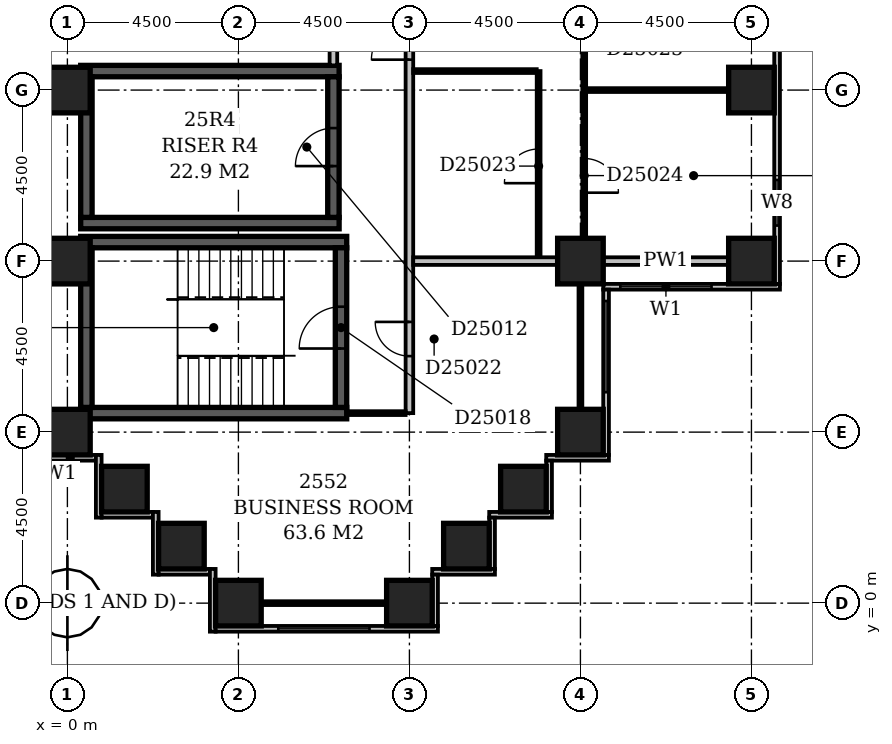
"""IFC4 building model, lengths in metres.
Left out: names, types, materials, properties, quantities, classifications, styles, units other than length and angle.
Written with IfcOpenShell. Run it as: python <this file> out.ifc"""

import sys

from ifc_helpers import new_model, si_unit, direction, frame, frame_2d, origin, origin_2d, place, context, subcontext, project, spatial, rectangle, extrude, element, fill, save


model = new_model("IFC4")
c1 = context("Model", 3, precision=1e-05, world=origin(), true_north=direction((0.0, 1.0)))
c2 = subcontext(c1, "Body", "Model", "MODEL_VIEW")
j1 = project(units=[si_unit("LENGTHUNIT", "METRE"), si_unit("PLANEANGLEUNIT", "RADIAN")], contexts=[c1])
p1 = place(None, origin())
s1 = spatial("IfcSite", under=j1, at=p1, CompositionType="ELEMENT")
p2 = place(p1, origin())
s2 = spatial("IfcBuilding", under=s1, at=p2, CompositionType="ELEMENT")
p3 = place(p2, frame((0.0, 0.0, 101.0)))
s3 = spatial("IfcBuildingStorey", under=s2, at=p3, CompositionType="ELEMENT", Elevation=101.0)
for number, where, z_axis, x_axis in (
    (1, (0.35, 5.0, -0.3), (0.0, 0.0, 1.0), (1.0, 0.0, 0.0)),
    (2, (0.35, 9.5, -0.3), (0.0, 0.0, 1.0), (1.0, 0.0, 0.0)),
):
    element("IfcWall", number, at=place(p3, frame(where, z_axis=z_axis, x_axis=x_axis)), inside=s3, PredefinedType="SHEAR", context=c2, shape_type="SweptSolid", body=[
        extrude(rectangle(XDim=7.0, YDim=0.3, at=frame_2d((3.5, 0.0))), origin(), (0.0, 0.0, 1.0), 3.6),
    ])
for number, where, z_axis, x_axis in (
    (3, (0.35, 10.0, -0.3), (0.0, 0.0, 1.0), (1.0, 0.0, 0.0)),
    (4, (0.35, 14.0, -0.3), (0.0, 0.0, 1.0), (1.0, 0.0, 0.0)),
):
    element("IfcWall", number, at=place(p3, frame(where, z_axis=z_axis, x_axis=x_axis)), inside=s3, PredefinedType="SHEAR", context=c2, shape_type="SweptSolid", body=[
        extrude(rectangle(XDim=6.8, YDim=0.3, at=frame_2d((3.4, 0.0))), origin(), (0.0, 0.0, 1.0), 3.6),
    ])
p4 = place(p3, frame((0.5, 5.15, -0.3), z_axis=(0.0, 0.0, 1.0), x_axis=(0.0, 1.0, 0.0)))
e5 = element("IfcWall", 5, at=p4, inside=s3, PredefinedType="SHEAR", context=c2, shape_type="SweptSolid", body=[
    extrude(rectangle(XDim=4.2, YDim=0.3, at=frame_2d((2.1, 0.0))), origin(), (0.0, 0.0, 1.0), 3.6),
])
p5 = place(p3, frame((0.5, 10.15, -0.3), z_axis=(0.0, 0.0, 1.0), x_axis=(0.0, 1.0, 0.0)))
e6 = element("IfcWall", 6, at=p5, inside=s3, PredefinedType="SHEAR", context=c2, shape_type="SweptSolid", body=[
    extrude(rectangle(XDim=3.7, YDim=0.3, at=frame_2d((1.85, 0.0))), origin(), (0.0, 0.0, 1.0), 3.6),
])
p6 = place(p3, frame((7.0, 10.15, -0.3), z_axis=(0.0, 0.0, 1.0), x_axis=(0.0, 1.0, 0.0)))
e7 = element("IfcWall", 7, at=p6, inside=s3, PredefinedType="SHEAR", context=c2, shape_type="SweptSolid", body=[
    extrude(rectangle(XDim=3.7, YDim=0.3, at=frame_2d((1.85, 0.0))), origin(), (0.0, 0.0, 1.0), 3.6),
])
p7 = place(p6, frame((1.35, 0.0, 0.3)))
e8 = element("IfcOpeningElement", 8, at=p7, cuts=e7, PredefinedType="OPENING", context=c2, shape_type="SweptSolid", body=[
    extrude(rectangle(XDim=1.0, YDim=2.1, at=frame_2d((0.5, 1.05))), frame((0.0, 0.162, 0.0), z_axis=(0.0, -1.0, 0.0), x_axis=(1.0, 0.0, 0.0)), (0.0, 0.0, 1.0), 0.324),
])
p8 = place(p3, frame((7.2, 5.15, -0.3), z_axis=(0.0, 0.0, 1.0), x_axis=(0.0, 1.0, 0.0)))
e9 = element("IfcWall", 9, at=p8, inside=s3, PredefinedType="SHEAR", context=c2, shape_type="SweptSolid", body=[
    extrude(rectangle(XDim=4.2, YDim=0.3, at=frame_2d((2.1, 0.0))), origin(), (0.0, 0.0, 1.0), 3.6),
])
p9 = place(p8, frame((1.55, 0.0, 0.3)))
e10 = element("IfcOpeningElement", 10, at=p9, cuts=e9, PredefinedType="OPENING", context=c2, shape_type="SweptSolid", body=[
    extrude(rectangle(XDim=1.1, YDim=2.1, at=frame_2d((0.55, 1.05))), frame((0.0, 0.162, 0.0), z_axis=(0.0, -1.0, 0.0), x_axis=(1.0, 0.0, 0.0)), (0.0, 0.0, 1.0), 0.324),
])
for number, where, z_axis, x_axis in (
    (11, (4.5, 0.0, -0.3), (0.0, 0.0, 1.0), (1.0, 0.0, 0.0)),
    (12, (9.0, 0.0, -0.3), (0.0, 0.0, 1.0), (1.0, 0.0, 0.0)),
    (13, (3.0, 1.5, -0.3), (0.0, 0.0, 1.0), (1.0, 0.0, 0.0)),
    (14, (10.5, 1.5, -0.3), (0.0, 0.0, 1.0), (1.0, 0.0, 0.0)),
    (15, (1.5, 3.0, -0.3), (0.0, 0.0, 1.0), (1.0, 0.0, 0.0)),
    (16, (12.0, 3.0, -0.3), (0.0, 0.0, 1.0), (1.0, 0.0, 0.0)),
    (17, (0.0, 4.5, -0.3), (0.0, 0.0, 1.0), (1.0, 0.0, 0.0)),
    (18, (13.5, 4.5, -0.3), (0.0, 0.0, 1.0), (1.0, 0.0, 0.0)),
    (19, (0.0, 9.0, -0.3), (0.0, 0.0, 1.0), (1.0, 0.0, 0.0)),
    (20, (13.5, 9.0, -0.3), (0.0, 0.0, 1.0), (1.0, 0.0, 0.0)),
    (21, (18.0, 9.0, -0.3), (0.0, 0.0, 1.0), (1.0, 0.0, 0.0)),
    (22, (0.0, 13.5, -0.3), (0.0, 0.0, 1.0), (1.0, 0.0, 0.0)),
    (23, (18.0, 13.5, -0.3), (0.0, 0.0, 1.0), (1.0, 0.0, 0.0)),
):
    element("IfcColumn", number, at=place(p3, frame(where, z_axis=z_axis, x_axis=x_axis)), inside=s3, PredefinedType="COLUMN", context=c2, shape_type="SweptSolid", body=[
        extrude(rectangle(XDim=1.2, YDim=1.2, at=origin_2d()), origin(), (0.0, 0.0, 1.0), 3.6),
    ])
p10 = place(p3, frame((9.675, -0.6, 0.0), z_axis=(0.0, 0.0, 1.0), x_axis=(0.0, 1.0, 0.0)))
e24 = element("IfcWall", 24, at=p10, inside=s3, PredefinedType="STANDARD", context=c2, shape_type="SweptSolid", body=[
    extrude(rectangle(XDim=1.35, YDim=0.15, at=frame_2d((0.675, 0.0))), origin(), (0.0, 0.0, 1.0), 2.7),
])
p11 = place(p3, frame((9.6, 0.825, 0.0), z_axis=(0.0, 0.0, 1.0), x_axis=(1.0, 0.0, 0.0)))
e25 = element("IfcWall", 25, at=p11, inside=s3, PredefinedType="STANDARD", context=c2, shape_type="SweptSolid", body=[
    extrude(rectangle(XDim=1.65, YDim=0.15, at=frame_2d((0.825, 0.0))), origin(), (0.0, 0.0, 1.0), 2.7),
])
p12 = place(p3, frame((11.175, 0.9, 0.0), z_axis=(0.0, 0.0, 1.0), x_axis=(0.0, 1.0, 0.0)))
e26 = element("IfcWall", 26, at=p12, inside=s3, PredefinedType="STANDARD", context=c2, shape_type="SweptSolid", body=[
    extrude(rectangle(XDim=1.35, YDim=0.15, at=frame_2d((0.675, 0.0))), origin(), (0.0, 0.0, 1.0), 2.7),
])
p13 = place(p3, frame((11.1, 2.325, 0.0), z_axis=(0.0, 0.0, 1.0), x_axis=(1.0, 0.0, 0.0)))
e27 = element("IfcWall", 27, at=p13, inside=s3, PredefinedType="STANDARD", context=c2, shape_type="SweptSolid", body=[
    extrude(rectangle(XDim=1.65, YDim=0.15, at=frame_2d((0.825, 0.0))), origin(), (0.0, 0.0, 1.0), 2.7),
])
p14 = place(p3, frame((12.675, 2.4, 0.0), z_axis=(0.0, 0.0, 1.0), x_axis=(0.0, 1.0, 0.0)))
e28 = element("IfcWall", 28, at=p14, inside=s3, PredefinedType="STANDARD", context=c2, shape_type="SweptSolid", body=[
    extrude(rectangle(XDim=1.35, YDim=0.15, at=frame_2d((0.675, 0.0))), origin(), (0.0, 0.0, 1.0), 2.7),
])
p15 = place(p3, frame((12.6, 3.825, 0.0), z_axis=(0.0, 0.0, 1.0), x_axis=(1.0, 0.0, 0.0)))
e29 = element("IfcWall", 29, at=p15, inside=s3, PredefinedType="STANDARD", context=c2, shape_type="SweptSolid", body=[
    extrude(rectangle(XDim=1.65, YDim=0.15, at=frame_2d((0.825, 0.0))), origin(), (0.0, 0.0, 1.0), 2.7),
])
p16 = place(p3, frame((14.175, 3.9, 0.0), z_axis=(0.0, 0.0, 1.0), x_axis=(0.0, 1.0, 0.0)))
e30 = element("IfcWall", 30, at=p16, inside=s3, PredefinedType="STANDARD", context=c2, shape_type="SweptSolid", body=[
    extrude(rectangle(XDim=4.35, YDim=0.15, at=frame_2d((2.175, 0.0))), origin(), (0.0, 0.0, 1.0), 2.7),
])
p17 = place(p16, frame((1.65, 0.0, 0.6)))
e31 = element("IfcOpeningElement", 31, at=p17, cuts=e30, PredefinedType="OPENING", context=c2, shape_type="SweptSolid", body=[
    extrude(rectangle(XDim=2.4, YDim=1.8, at=frame_2d((1.2, 0.9))), frame((0.0, 0.087, 0.0), z_axis=(0.0, -1.0, 0.0), x_axis=(1.0, 0.0, 0.0)), (0.0, 0.0, 1.0), 0.174),
])
p18 = place(p3, frame((14.1, 8.325, 0.0), z_axis=(0.0, 0.0, 1.0), x_axis=(1.0, 0.0, 0.0)))
e32 = element("IfcWall", 32, at=p18, inside=s3, PredefinedType="STANDARD", context=c2, shape_type="SweptSolid", body=[
    extrude(rectangle(XDim=4.65, YDim=0.15, at=frame_2d((2.325, 0.0))), origin(), (0.0, 0.0, 1.0), 2.7),
])
p19 = place(p18, frame((0.45, 0.0, 0.6)))
e33 = element("IfcOpeningElement", 33, at=p19, cuts=e32, PredefinedType="OPENING", context=c2, shape_type="SweptSolid", body=[
    extrude(rectangle(XDim=2.4, YDim=1.8, at=frame_2d((1.2, 0.9))), frame((0.0, 0.087, 0.0), z_axis=(0.0, -1.0, 0.0), x_axis=(1.0, 0.0, 0.0)), (0.0, 0.0, 1.0), 0.174),
])
p20 = place(p3, frame((18.675, 8.4, 0.0), z_axis=(0.0, 0.0, 1.0), x_axis=(0.0, 1.0, 0.0)))
e34 = element("IfcWall", 34, at=p20, inside=s3, PredefinedType="STANDARD", context=c2, shape_type="SweptSolid", body=[
    extrude(rectangle(XDim=8.85, YDim=0.15, at=frame_2d((4.425, 0.0))), origin(), (0.0, 0.0, 1.0), 2.7),
])
p21 = place(p20, frame((1.535, 0.0, 0.6)))
e35 = element("IfcOpeningElement", 35, at=p21, cuts=e34, PredefinedType="OPENING", context=c2, shape_type="SweptSolid", body=[
    extrude(rectangle(XDim=1.2, YDim=1.8, at=frame_2d((0.6, 0.9))), frame((0.0, 0.087, 0.0), z_axis=(0.0, -1.0, 0.0), x_axis=(1.0, 0.0, 0.0)), (0.0, 0.0, 1.0), 0.174),
])
p22 = place(p20, frame((6.15, 0.0, 0.6)))
e36 = element("IfcOpeningElement", 36, at=p22, cuts=e34, PredefinedType="OPENING", context=c2, shape_type="SweptSolid", body=[
    extrude(rectangle(XDim=2.4, YDim=1.8, at=frame_2d((1.2, 0.9))), frame((0.0, 0.087, 0.0), z_axis=(0.0, -1.0, 0.0), x_axis=(1.0, 0.0, 0.0)), (0.0, 0.0, 1.0), 0.174),
])
p23 = place(p3, frame((-0.6, 3.825, 0.0), z_axis=(0.0, 0.0, 1.0), x_axis=(1.0, 0.0, 0.0)))
e37 = element("IfcWall", 37, at=p23, inside=s3, PredefinedType="STANDARD", context=c2, shape_type="SweptSolid", body=[
    extrude(rectangle(XDim=1.35, YDim=0.15, at=frame_2d((0.675, 0.0))), origin(), (0.0, 0.0, 1.0), 2.7),
])
p24 = place(p3, frame((0.825, 3.9, 0.0), z_axis=(0.0, 0.0, 1.0), x_axis=(0.0, -1.0, 0.0)))
e38 = element("IfcWall", 38, at=p24, inside=s3, PredefinedType="STANDARD", context=c2, shape_type="SweptSolid", body=[
    extrude(rectangle(XDim=1.65, YDim=0.15, at=frame_2d((0.825, 0.0))), origin(), (0.0, 0.0, 1.0), 2.7),
])
p25 = place(p3, frame((0.9, 2.325, 0.0), z_axis=(0.0, 0.0, 1.0), x_axis=(1.0, 0.0, 0.0)))
e39 = element("IfcWall", 39, at=p25, inside=s3, PredefinedType="STANDARD", context=c2, shape_type="SweptSolid", body=[
    extrude(rectangle(XDim=1.35, YDim=0.15, at=frame_2d((0.675, 0.0))), origin(), (0.0, 0.0, 1.0), 2.7),
])
p26 = place(p3, frame((2.325, 2.4, 0.0), z_axis=(0.0, 0.0, 1.0), x_axis=(0.0, -1.0, 0.0)))
e40 = element("IfcWall", 40, at=p26, inside=s3, PredefinedType="STANDARD", context=c2, shape_type="SweptSolid", body=[
    extrude(rectangle(XDim=1.65, YDim=0.15, at=frame_2d((0.825, 0.0))), origin(), (0.0, 0.0, 1.0), 2.7),
])
p27 = place(p3, frame((2.4, 0.825, 0.0), z_axis=(0.0, 0.0, 1.0), x_axis=(1.0, 0.0, 0.0)))
e41 = element("IfcWall", 41, at=p27, inside=s3, PredefinedType="STANDARD", context=c2, shape_type="SweptSolid", body=[
    extrude(rectangle(XDim=1.35, YDim=0.15, at=frame_2d((0.675, 0.0))), origin(), (0.0, 0.0, 1.0), 2.7),
])
p28 = place(p3, frame((3.825, 0.9, 0.0), z_axis=(0.0, 0.0, 1.0), x_axis=(0.0, -1.0, 0.0)))
e42 = element("IfcWall", 42, at=p28, inside=s3, PredefinedType="STANDARD", context=c2, shape_type="SweptSolid", body=[
    extrude(rectangle(XDim=1.65, YDim=0.15, at=frame_2d((0.825, 0.0))), origin(), (0.0, 0.0, 1.0), 2.7),
])
p29 = place(p3, frame((3.9, -0.675, 0.0), z_axis=(0.0, 0.0, 1.0), x_axis=(1.0, 0.0, 0.0)))
e43 = element("IfcWall", 43, at=p29, inside=s3, PredefinedType="STANDARD", context=c2, shape_type="SweptSolid", body=[
    extrude(rectangle(XDim=5.85, YDim=0.15, at=frame_2d((2.925, 0.0))), origin(), (0.0, 0.0, 1.0), 2.7),
])
p30 = place(p29, frame((1.65, 0.0, 0.6)))
e44 = element("IfcOpeningElement", 44, at=p30, cuts=e43, PredefinedType="OPENING", context=c2, shape_type="SweptSolid", body=[
    extrude(rectangle(XDim=2.4, YDim=1.8, at=frame_2d((1.2, 0.9))), frame((0.0, 0.087, 0.0), z_axis=(0.0, -1.0, 0.0), x_axis=(1.0, 0.0, 0.0)), (0.0, 0.0, 1.0), 0.174),
])
p31 = place(p3, frame((5.1, 0.0, 0.0), z_axis=(0.0, 0.0, 1.0), x_axis=(1.0, 0.0, 0.0)))
e45 = element("IfcWall", 45, at=p31, inside=s3, PredefinedType="PARTITIONING", context=c2, shape_type="SweptSolid", body=[
    extrude(rectangle(XDim=3.3, YDim=0.1, at=frame_2d((1.65, 0.0))), origin(), (0.0, 0.0, 1.0), 2.7),
])
p32 = place(p3, frame((0.0, 4.4, 0.0), z_axis=(0.0, 0.0, 1.0), x_axis=(0.0, 1.0, 0.0)))
e46 = element("IfcWall", 46, at=p32, inside=s3, PredefinedType="PARTITIONING", context=c2, shape_type="SweptSolid", body=[
    extrude(rectangle(XDim=0.7, YDim=0.1, at=frame_2d((0.35, 0.0))), origin(), (0.0, 0.0, 1.0), 2.7),
])
p33 = place(p3, frame((7.349, 5.0, 0.0), z_axis=(0.0, 0.0, 1.0), x_axis=(1.0, 0.0, 0.0)))
e47 = element("IfcWall", 47, at=p33, inside=s3, PredefinedType="PARTITIONING", context=c2, shape_type="SweptSolid", body=[
    extrude(rectangle(XDim=1.551, YDim=0.1, at=frame_2d((0.775, 0.0))), origin(), (0.0, 0.0, 1.0), 3.3),
])
p34 = place(p3, frame((9.0, 5.0, 0.0), z_axis=(0.0, 0.0, 1.0), x_axis=(0.0, 1.0, 0.0)))
e48 = element("IfcWall", 48, at=p34, inside=s3, PredefinedType="PARTITIONING", context=c2, shape_type="SweptSolid", body=[
    extrude(rectangle(XDim=44.5, YDim=0.2, at=frame_2d((22.25, 0.0))), origin(), (0.0, 0.0, 1.0), 3.3),
])
p35 = place(p34, frame((18.4, 0.0, 0.0)))
e49 = element("IfcOpeningElement", 49, at=p35, cuts=e48, PredefinedType="OPENING", context=c2, shape_type="SweptSolid", body=[
    extrude(rectangle(XDim=1.0, YDim=2.1, at=frame_2d((0.5, 1.05))), frame((0.0, 0.112, 0.0), z_axis=(0.0, -1.0, 0.0), x_axis=(1.0, 0.0, 0.0)), (0.0, 0.0, 1.0), 0.224),
])
p36 = place(p34, frame((9.3, 0.0, 0.0)))
e50 = element("IfcOpeningElement", 50, at=p36, cuts=e48, PredefinedType="OPENING", context=c2, shape_type="SweptSolid", body=[
    extrude(rectangle(XDim=1.0, YDim=2.1, at=frame_2d((0.5, 1.05))), frame((0.0, 0.112, 0.0), z_axis=(0.0, -1.0, 0.0), x_axis=(1.0, 0.0, 0.0)), (0.0, 0.0, 1.0), 0.224),
])
p37 = place(p34, frame((37.25, 0.0, 0.0)))
e51 = element("IfcOpeningElement", 51, at=p37, cuts=e48, PredefinedType="OPENING", context=c2, shape_type="SweptSolid", body=[
    extrude(rectangle(XDim=0.9, YDim=2.1, at=frame_2d((0.45, 1.05))), frame((0.0, 0.112, 0.0), z_axis=(0.0, -1.0, 0.0), x_axis=(1.0, 0.0, 0.0)), (0.0, 0.0, 1.0), 0.224),
])
p38 = place(p34, frame((1.5, 0.0, 0.0)))
e52 = element("IfcOpeningElement", 52, at=p38, cuts=e48, PredefinedType="OPENING", context=c2, shape_type="SweptSolid", body=[
    extrude(rectangle(XDim=0.9, YDim=2.1, at=frame_2d((0.45, 1.05))), frame((0.0, 0.112, 0.0), z_axis=(0.0, -1.0, 0.0), x_axis=(1.0, 0.0, 0.0)), (0.0, 0.0, 1.0), 0.224),
])
p39 = place(p3, frame((13.5, 5.1, 0.0), z_axis=(0.0, 0.0, 1.0), x_axis=(0.0, 1.0, 0.0)))
e53 = element("IfcWall", 53, at=p39, inside=s3, PredefinedType="PARTITIONING", context=c2, shape_type="SweptSolid", body=[
    extrude(rectangle(XDim=3.3, YDim=0.1, at=frame_2d((1.65, 0.0))), origin(), (0.0, 0.0, 1.0), 2.7),
])
p40 = place(p3, frame((9.1, 9.0, 0.0), z_axis=(0.0, 0.0, 1.0), x_axis=(1.0, 0.0, 0.0)))
e54 = element("IfcWall", 54, at=p40, inside=s3, PredefinedType="PARTITIONING", context=c2, shape_type="SweptSolid", body=[
    extrude(rectangle(XDim=3.8, YDim=0.2, at=frame_2d((1.9, 0.0))), origin(), (0.0, 0.0, 1.0), 3.3),
])
p41 = place(p3, frame((14.1, 9.0, 0.0), z_axis=(0.0, 0.0, 1.0), x_axis=(1.0, 0.0, 0.0)))
e55 = element("IfcWall", 55, at=p41, inside=s3, PredefinedType="PARTITIONING", context=c2, shape_type="SweptSolid", body=[
    extrude(rectangle(XDim=3.3, YDim=0.2, at=frame_2d((1.65, 0.0))), origin(), (0.0, 0.0, 1.0), 2.7),
])
p42 = place(p3, frame((12.4, 9.1, 0.0), z_axis=(0.0, 0.0, 1.0), x_axis=(0.0, 1.0, 0.0)))
e56 = element("IfcWall", 56, at=p42, inside=s3, PredefinedType="PARTITIONING", context=c2, shape_type="SweptSolid", body=[
    extrude(rectangle(XDim=4.9, YDim=0.1, at=frame_2d((2.45, 0.0))), origin(), (0.0, 0.0, 1.0), 3.3),
])
p43 = place(p42, frame((1.95, 0.0, 0.0)))
e57 = element("IfcOpeningElement", 57, at=p43, cuts=e56, PredefinedType="OPENING", context=c2, shape_type="SweptSolid", body=[
    extrude(rectangle(XDim=0.9, YDim=2.1, at=frame_2d((0.45, 1.05))), frame((0.0, 0.062, 0.0), z_axis=(0.0, -1.0, 0.0), x_axis=(1.0, 0.0, 0.0)), (0.0, 0.0, 1.0), 0.124),
])
p44 = place(p3, frame((13.6, 9.6, 0.0), z_axis=(0.0, 0.0, 1.0), x_axis=(0.0, 1.0, 0.0)))
e58 = element("IfcWall", 58, at=p44, inside=s3, PredefinedType="PARTITIONING", context=c2, shape_type="SweptSolid", body=[
    extrude(rectangle(XDim=8.3, YDim=0.1, at=frame_2d((4.15, 0.0))), origin(), (0.0, 0.0, 1.0), 3.3),
])
p45 = place(p44, frame((1.2, 0.0, 0.0)))
e59 = element("IfcOpeningElement", 59, at=p45, cuts=e58, PredefinedType="OPENING", context=c2, shape_type="SweptSolid", body=[
    extrude(rectangle(XDim=0.9, YDim=2.1, at=frame_2d((0.45, 1.05))), frame((0.0, 0.062, 0.0), z_axis=(0.0, -1.0, 0.0), x_axis=(1.0, 0.0, 0.0)), (0.0, 0.0, 1.0), 0.124),
])
p46 = place(p44, frame((5.7, 0.0, 0.0)))
e60 = element("IfcOpeningElement", 60, at=p46, cuts=e58, PredefinedType="OPENING", context=c2, shape_type="SweptSolid", body=[
    extrude(rectangle(XDim=0.9, YDim=2.1, at=frame_2d((0.45, 1.05))), frame((0.0, 0.062, 0.0), z_axis=(0.0, -1.0, 0.0), x_axis=(1.0, 0.0, 0.0)), (0.0, 0.0, 1.0), 0.124),
])
p47 = place(p3, frame((13.65, 13.5, 0.0), z_axis=(0.0, 0.0, 1.0), x_axis=(1.0, 0.0, 0.0)))
e61 = element("IfcWall", 61, at=p47, inside=s3, PredefinedType="PARTITIONING", context=c2, shape_type="SweptSolid", body=[
    extrude(rectangle(XDim=3.75, YDim=0.1, at=frame_2d((1.875, 0.0))), origin(), (0.0, 0.0, 1.0), 3.3),
])
p48 = place(p3, frame((9.1, 14.0, 0.0), z_axis=(0.0, 0.0, 1.0), x_axis=(1.0, 0.0, 0.0)))
e62 = element("IfcWall", 62, at=p48, inside=s3, PredefinedType="PARTITIONING", context=c2, shape_type="SweptSolid", body=[
    extrude(rectangle(XDim=3.25, YDim=0.1, at=frame_2d((1.625, 0.0))), origin(), (0.0, 0.0, 1.0), 3.3),
])
p49 = place(p3, frame((7.0, 14.15, 0.0), z_axis=(0.0, 0.0, 1.0), x_axis=(0.0, 1.0, 0.0)))
e63 = element("IfcWall", 63, at=p49, inside=s3, PredefinedType="PARTITIONING", context=c2, shape_type="SweptSolid", body=[
    extrude(rectangle(XDim=4.2, YDim=0.2, at=frame_2d((2.1, 0.0))), origin(), (0.0, 0.0, 1.0), 3.3),
])
p50 = place(p49, frame((1.6, 0.0, 0.0)))
e64 = element("IfcOpeningElement", 64, at=p50, cuts=e63, PredefinedType="OPENING", context=c2, shape_type="SweptSolid", body=[
    extrude(rectangle(XDim=1.0, YDim=2.1, at=frame_2d((0.5, 1.05))), frame((0.0, 0.112, 0.0), z_axis=(0.0, -1.0, 0.0), x_axis=(1.0, 0.0, 0.0)), (0.0, 0.0, 1.0), 0.224),
])
p51 = place(p17, origin())
e65 = element("IfcWindow", 65, at=p51, inside=s3, PartitioningType="SINGLE_PANEL", PredefinedType="WINDOW", context=c2, shape_type="SweptSolid", body=[
    extrude(rectangle(XDim=2.4, YDim=1.8, at=frame_2d((1.2, 0.9))), frame((0.0, 0.03, 0.0), z_axis=(0.0, -1.0, 0.0), x_axis=(1.0, 0.0, 0.0)), (0.0, 0.0, 1.0), 0.06),
])
fill(e31, e65)
p52 = place(p19, origin())
e66 = element("IfcWindow", 66, at=p52, inside=s3, PartitioningType="SINGLE_PANEL", PredefinedType="WINDOW", context=c2, shape_type="SweptSolid", body=[
    extrude(rectangle(XDim=2.4, YDim=1.8, at=frame_2d((1.2, 0.9))), frame((0.0, 0.03, 0.0), z_axis=(0.0, -1.0, 0.0), x_axis=(1.0, 0.0, 0.0)), (0.0, 0.0, 1.0), 0.06),
])
fill(e33, e66)
p53 = place(p21, origin())
e67 = element("IfcWindow", 67, at=p53, inside=s3, PartitioningType="SINGLE_PANEL", PredefinedType="WINDOW", context=c2, shape_type="SweptSolid", body=[
    extrude(rectangle(XDim=1.2, YDim=1.8, at=frame_2d((0.6, 0.9))), frame((0.0, 0.03, 0.0), z_axis=(0.0, -1.0, 0.0), x_axis=(1.0, 0.0, 0.0)), (0.0, 0.0, 1.0), 0.06),
])
fill(e35, e67)
p54 = place(p30, origin())
e68 = element("IfcWindow", 68, at=p54, inside=s3, PartitioningType="SINGLE_PANEL", PredefinedType="WINDOW", context=c2, shape_type="SweptSolid", body=[
    extrude(rectangle(XDim=2.4, YDim=1.8, at=frame_2d((1.2, 0.9))), frame((0.0, 0.03, 0.0), z_axis=(0.0, -1.0, 0.0), x_axis=(1.0, 0.0, 0.0)), (0.0, 0.0, 1.0), 0.06),
])
fill(e44, e68)
p55 = place(p7, origin())
e69 = element("IfcDoor", 69, at=p55, inside=s3, OperationType="SINGLE_SWING_LEFT", PredefinedType="DOOR", context=c2, shape_type="SweptSolid", body=[
    extrude(rectangle(XDim=1.0, YDim=2.1, at=frame_2d((0.5, 1.05))), frame((0.0, 0.025, 0.0), z_axis=(0.0, -1.0, 0.0), x_axis=(1.0, 0.0, 0.0)), (0.0, 0.0, 1.0), 0.05),
])
fill(e8, e69)
p56 = place(p9, origin())
e70 = element("IfcDoor", 70, at=p56, inside=s3, OperationType="SINGLE_SWING_LEFT", PredefinedType="DOOR", context=c2, shape_type="SweptSolid", body=[
    extrude(rectangle(XDim=1.1, YDim=2.1, at=frame_2d((0.55, 1.05))), frame((0.0, 0.025, 0.0), z_axis=(0.0, -1.0, 0.0), x_axis=(1.0, 0.0, 0.0)), (0.0, 0.0, 1.0), 0.05),
])
fill(e10, e70)
p57 = place(p36, origin())
e71 = element("IfcDoor", 71, at=p57, inside=s3, OperationType="SINGLE_SWING_LEFT", PredefinedType="DOOR", context=c2, shape_type="SweptSolid", body=[
    extrude(rectangle(XDim=1.0, YDim=2.1, at=frame_2d((0.5, 1.05))), frame((0.0, 0.025, 0.0), z_axis=(0.0, -1.0, 0.0), x_axis=(1.0, 0.0, 0.0)), (0.0, 0.0, 1.0), 0.05),
])
fill(e50, e71)
p58 = place(p38, frame((0.9, 0.0, 0.0), z_axis=(0.0, 0.0, 1.0), x_axis=(-1.0, 0.0, 0.0)))
e72 = element("IfcDoor", 72, at=p58, inside=s3, OperationType="SINGLE_SWING_LEFT", PredefinedType="DOOR", context=c2, shape_type="SweptSolid", body=[
    extrude(rectangle(XDim=0.9, YDim=2.1, at=frame_2d((0.45, 1.05))), frame((0.0, 0.025, 0.0), z_axis=(0.0, -1.0, 0.0), x_axis=(1.0, 0.0, 0.0)), (0.0, 0.0, 1.0), 0.05),
])
fill(e52, e72)
p59 = place(p43, origin())
e73 = element("IfcDoor", 73, at=p59, inside=s3, OperationType="SINGLE_SWING_LEFT", PredefinedType="DOOR", context=c2, shape_type="SweptSolid", body=[
    extrude(rectangle(XDim=0.9, YDim=2.1, at=frame_2d((0.45, 1.05))), frame((0.0, 0.025, 0.0), z_axis=(0.0, -1.0, 0.0), x_axis=(1.0, 0.0, 0.0)), (0.0, 0.0, 1.0), 0.05),
])
fill(e57, e73)
p60 = place(p45, frame((0.9, 0.0, 0.0), z_axis=(0.0, 0.0, 1.0), x_axis=(-1.0, 0.0, 0.0)))
e74 = element("IfcDoor", 74, at=p60, inside=s3, OperationType="SINGLE_SWING_RIGHT", PredefinedType="DOOR", context=c2, shape_type="SweptSolid", body=[
    extrude(rectangle(XDim=0.9, YDim=2.1, at=frame_2d((0.45, 1.05))), frame((0.0, 0.025, 0.0), z_axis=(0.0, -1.0, 0.0), x_axis=(1.0, 0.0, 0.0)), (0.0, 0.0, 1.0), 0.05),
])
fill(e59, e74)
save(model, sys.argv[1])
